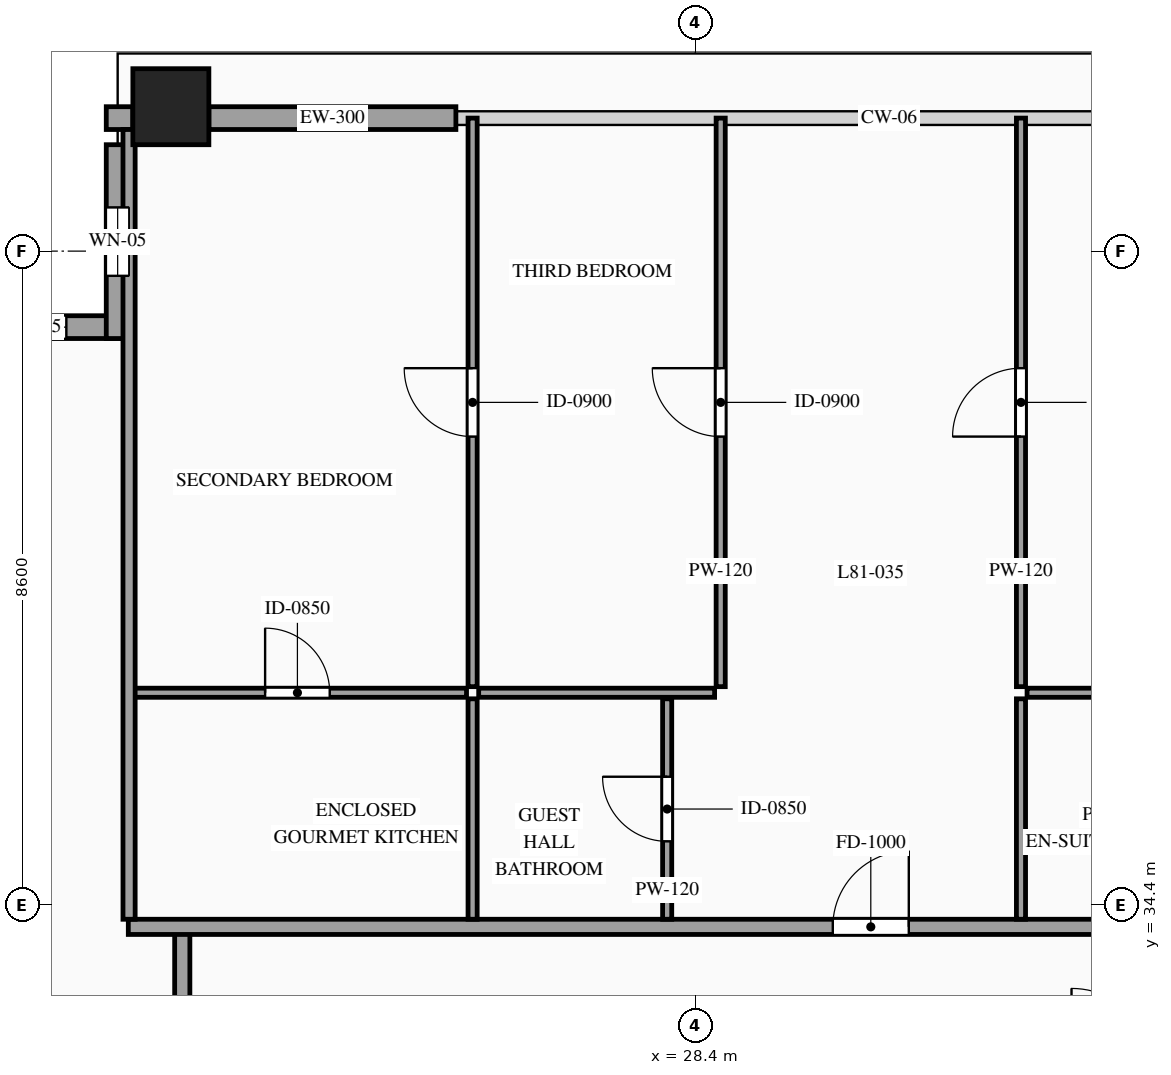
"""IFC4 building model, lengths in metres.
Left out: names, types, materials, properties, quantities, classifications, styles, units other than length and angle.
Written with IfcOpenShell. Run it as: python <this file> out.ifc"""

import sys

from ifc_helpers import new_model, si_unit, direction, frame, frame_2d, origin, origin_2d, place, context, subcontext, project, spatial, rectangle, hollow_rectangle, extrude, source, transform, mapped, element, fill, save


model = new_model("IFC4")
c1 = context("Model", 3, precision=1e-05, world=origin(), true_north=direction((0.0, 1.0)))
c2 = subcontext(c1, "Body", "Model", "MODEL_VIEW")
j1 = project(units=[si_unit("LENGTHUNIT", "METRE"), si_unit("PLANEANGLEUNIT", "RADIAN")], contexts=[c1])
p1 = place(None, origin())
s1 = spatial("IfcSite", under=j1, at=p1, CompositionType="ELEMENT")
p2 = place(p1, origin())
s2 = spatial("IfcBuilding", under=s1, at=p2, CompositionType="ELEMENT")
p3 = place(p2, frame((0.0, 0.0, 303.1)))
s3 = spatial("IfcBuildingStorey", under=s2, at=p3, CompositionType="ELEMENT", Elevation=303.1)
m1 = source(origin(), c2, "Body", "SweptSolid", [
    extrude(hollow_rectangle(XDim=1.0, YDim=1.0, WallThickness=0.048, at=origin_2d()), origin(), (0.0, 0.0, 1.0), 3.5),
])
p4 = place(p3, frame((21.5, 44.9, 0.0), z_axis=(0.0, 0.0, 1.0), x_axis=(1.0, 0.0, 0.0)))
e1 = element("IfcColumn", 1, at=p4, inside=s3, PredefinedType="COLUMN", context=c2, shape_type="MappedRepresentation", body=[
    mapped(m1, transform((0.0, 0.0, 0.0), scale=1.0)),
])
p5 = place(p3, frame((20.95, 42.0, 0.0), z_axis=(0.0, 0.0, 1.0), x_axis=(-1.0, 0.0, 0.0)))
e2 = element("IfcWall", 2, at=p5, inside=s3, PredefinedType="SOLIDWALL", context=c2, shape_type="SweptSolid", body=[
    extrude(rectangle(XDim=2.55, YDim=0.3, at=frame_2d((1.275, 0.0))), origin(), (0.0, 0.0, 1.0), 3.22),
])
p6 = place(p5, frame((0.825, 0.0, 0.75)))
e3 = element("IfcOpeningElement", 3, at=p6, cuts=e2, PredefinedType="OPENING", context=c2, shape_type="SweptSolid", body=[
    extrude(rectangle(XDim=0.9, YDim=1.5, at=frame_2d((0.45, 0.75))), frame((0.0, 0.165, 0.0), z_axis=(0.0, -1.0, 0.0), x_axis=(1.0, 0.0, 0.0)), (0.0, 0.0, 1.0), 0.33),
])
p7 = place(p3, frame((20.8, 44.4, 0.0), z_axis=(0.0, 0.0, 1.0), x_axis=(0.0, -1.0, 0.0)))
e4 = element("IfcWall", 4, at=p7, inside=s3, PredefinedType="SOLIDWALL", context=c2, shape_type="SweptSolid", body=[
    extrude(rectangle(XDim=2.55, YDim=0.3, at=frame_2d((1.275, 0.0))), origin(), (0.0, 0.0, 1.0), 3.22),
])
p8 = place(p7, frame((0.825, 0.0, 0.75)))
e5 = element("IfcOpeningElement", 5, at=p8, cuts=e4, PredefinedType="OPENING", context=c2, shape_type="SweptSolid", body=[
    extrude(rectangle(XDim=0.9, YDim=1.5, at=frame_2d((0.45, 0.75))), frame((0.0, 0.165, 0.0), z_axis=(0.0, -1.0, 0.0), x_axis=(1.0, 0.0, 0.0)), (0.0, 0.0, 1.0), 0.33),
])
m2 = source(origin(), c2, "Body", "SweptSolid", [
    extrude(rectangle(XDim=0.35, YDim=0.3, at=frame_2d((0.175, 0.0))), origin(), (0.0, 0.0, 1.0), 3.22),
])
p9 = place(p3, frame((20.65, 44.75, 0.0), z_axis=(0.0, 0.0, 1.0), x_axis=(1.0, 0.0, 0.0)))
e6 = element("IfcWall", 6, at=p9, inside=s3, PredefinedType="SOLIDWALL", context=c2, shape_type="MappedRepresentation", body=[
    mapped(m2, transform((0.0, 0.0, 0.0), scale=1.0)),
])
m3 = source(origin(), c2, "Body", "SweptSolid", [
    extrude(rectangle(XDim=3.25, YDim=0.3, at=frame_2d((1.625, 0.0))), origin(), (0.0, 0.0, 1.0), 2.825),
])
p10 = place(p3, frame((22.0, 44.75, 0.0), z_axis=(0.0, 0.0, 1.0), x_axis=(1.0, 0.0, 0.0)))
e7 = element("IfcWall", 7, at=p10, inside=s3, PredefinedType="SOLIDWALL", context=c2, shape_type="MappedRepresentation", body=[
    mapped(m3, transform((0.0, 0.0, 0.0), scale=1.0)),
])
m4 = source(origin(), c2, "Body", "SweptSolid", [
    extrude(rectangle(XDim=1.7, YDim=0.2, at=frame_2d((0.85, 0.0))), origin(), (0.0, 0.0, 1.0), 3.22),
])
p11 = place(p3, frame((21.65, 32.35, 0.0), z_axis=(0.0, 0.0, 1.0), x_axis=(0.0, 1.0, 0.0)))
e8 = element("IfcWall", 8, at=p11, inside=s3, PredefinedType="PARTITIONING", context=c2, shape_type="MappedRepresentation", body=[
    mapped(m4, transform((0.0, 0.0, 0.0), scale=1.0)),
])
p12 = place(p3, frame((20.94, 34.11, 0.0), z_axis=(0.0, 0.0, 1.0), x_axis=(1.0, 0.0, 0.0)))
e9 = element("IfcWall", 9, at=p12, inside=s3, PredefinedType="PARTITIONING", context=c2, shape_type="SweptSolid", body=[
    extrude(rectangle(XDim=15.98, YDim=0.2, at=frame_2d((7.99, 0.0))), origin(), (0.0, 0.0, 1.0), 3.22),
])
p13 = place(p12, frame((9.269, 0.0, 0.0)))
e10 = element("IfcOpeningElement", 10, at=p13, cuts=e9, PredefinedType="OPENING", context=c2, shape_type="SweptSolid", body=[
    extrude(rectangle(XDim=1.0, YDim=2.2, at=frame_2d((0.5, 1.1))), frame((0.0, 0.115, 0.0), z_axis=(0.0, -1.0, 0.0), x_axis=(1.0, 0.0, 0.0)), (0.0, 0.0, 1.0), 0.23),
])
p14 = place(p3, frame((20.94, 37.19, 0.0), z_axis=(0.0, 0.0, 1.0), x_axis=(1.0, 0.0, 0.0)))
e11 = element("IfcWall", 11, at=p14, inside=s3, PredefinedType="PARTITIONING", context=c2, shape_type="SweptSolid", body=[
    extrude(rectangle(XDim=4.45, YDim=0.12, at=frame_2d((2.225, 0.0))), origin(), (0.0, 0.0, 1.0), 3.22),
])
p15 = place(p14, frame((1.8, 0.0, 0.0)))
e12 = element("IfcOpeningElement", 12, at=p15, cuts=e11, PredefinedType="OPENING", context=c2, shape_type="SweptSolid", body=[
    extrude(rectangle(XDim=0.85, YDim=2.1, at=frame_2d((0.425, 1.05))), frame((0.0, 0.075, 0.0), z_axis=(0.0, -1.0, 0.0), x_axis=(1.0, 0.0, 0.0)), (0.0, 0.0, 1.0), 0.15),
])
m5 = source(origin(), c2, "Body", "SweptSolid", [
    extrude(rectangle(XDim=2.9, YDim=0.12, at=frame_2d((1.45, 0.0))), origin(), (0.0, 0.0, 1.0), 3.22),
])
p16 = place(p3, frame((25.47, 34.21, 0.0), z_axis=(0.0, 0.0, 1.0), x_axis=(0.0, 1.0, 0.0)))
e13 = element("IfcWall", 13, at=p16, inside=s3, PredefinedType="PARTITIONING", context=c2, shape_type="MappedRepresentation", body=[
    mapped(m5, transform((0.0, 0.0, 0.0), scale=1.0)),
])
p17 = place(p3, frame((28.03, 34.21, 0.0), z_axis=(0.0, 0.0, 1.0), x_axis=(0.0, 1.0, 0.0)))
e14 = element("IfcWall", 14, at=p17, inside=s3, PredefinedType="PARTITIONING", context=c2, shape_type="SweptSolid", body=[
    extrude(rectangle(XDim=2.9, YDim=0.12, at=frame_2d((1.45, 0.0))), origin(), (0.0, 0.0, 1.0), 3.22),
])
p18 = place(p17, frame((1.025, 0.0, 0.0)))
e15 = element("IfcOpeningElement", 15, at=p18, cuts=e14, PredefinedType="OPENING", context=c2, shape_type="SweptSolid", body=[
    extrude(rectangle(XDim=0.85, YDim=2.1, at=frame_2d((0.425, 1.05))), frame((0.0, 0.075, 0.0), z_axis=(0.0, -1.0, 0.0), x_axis=(1.0, 0.0, 0.0)), (0.0, 0.0, 1.0), 0.15),
])
p19 = place(p3, frame((32.765, 37.19, 0.0), z_axis=(0.0, 0.0, 1.0), x_axis=(1.0, 0.0, 0.0)))
e16 = element("IfcWall", 16, at=p19, inside=s3, PredefinedType="PARTITIONING", context=c2, shape_type="SweptSolid", body=[
    extrude(rectangle(XDim=4.155, YDim=0.12, at=frame_2d((2.078, 0.0))), origin(), (0.0, 0.0, 1.0), 3.22),
])
p20 = place(p19, frame((1.653, 0.0, 0.0)))
e17 = element("IfcOpeningElement", 17, at=p20, cuts=e16, PredefinedType="OPENING", context=c2, shape_type="SweptSolid", body=[
    extrude(rectangle(XDim=0.85, YDim=2.1, at=frame_2d((0.425, 1.05))), frame((0.0, 0.075, 0.0), z_axis=(0.0, -1.0, 0.0), x_axis=(1.0, 0.0, 0.0)), (0.0, 0.0, 1.0), 0.15),
])
p21 = place(p3, frame((32.685, 34.21, 0.0), z_axis=(0.0, 0.0, 1.0), x_axis=(0.0, 1.0, 0.0)))
e18 = element("IfcWall", 18, at=p21, inside=s3, PredefinedType="PARTITIONING", context=c2, shape_type="MappedRepresentation", body=[
    mapped(m5, transform((0.0, 0.0, 0.0), scale=1.0)),
])
p22 = place(p3, frame((25.47, 37.27, 0.0), z_axis=(0.0, 0.0, 1.0), x_axis=(0.0, 1.0, 0.0)))
e19 = element("IfcWall", 19, at=p22, inside=s3, PredefinedType="PARTITIONING", context=c2, shape_type="SweptSolid", body=[
    extrude(rectangle(XDim=7.48, YDim=0.12, at=frame_2d((3.74, 0.0))), origin(), (0.0, 0.0, 1.0), 3.22),
])
p23 = place(p22, frame((3.29, 0.0, 0.0)))
e20 = element("IfcOpeningElement", 20, at=p23, cuts=e19, PredefinedType="OPENING", context=c2, shape_type="SweptSolid", body=[
    extrude(rectangle(XDim=0.9, YDim=2.15, at=frame_2d((0.45, 1.075))), frame((0.0, 0.075, 0.0), z_axis=(0.0, -1.0, 0.0), x_axis=(1.0, 0.0, 0.0)), (0.0, 0.0, 1.0), 0.15),
])
p24 = place(p3, frame((32.685, 37.27, 0.0), z_axis=(0.0, 0.0, 1.0), x_axis=(0.0, 1.0, 0.0)))
e21 = element("IfcWall", 21, at=p24, inside=s3, PredefinedType="PARTITIONING", context=c2, shape_type="SweptSolid", body=[
    extrude(rectangle(XDim=7.48, YDim=0.12, at=frame_2d((3.74, 0.0))), origin(), (0.0, 0.0, 1.0), 3.22),
])
p25 = place(p24, frame((3.29, 0.0, 0.0)))
e22 = element("IfcOpeningElement", 22, at=p25, cuts=e21, PredefinedType="OPENING", context=c2, shape_type="SweptSolid", body=[
    extrude(rectangle(XDim=0.9, YDim=2.15, at=frame_2d((0.45, 1.075))), frame((0.0, 0.075, 0.0), z_axis=(0.0, -1.0, 0.0), x_axis=(1.0, 0.0, 0.0)), (0.0, 0.0, 1.0), 0.15),
])
m6 = source(origin(), c2, "Body", "SweptSolid", [
    extrude(rectangle(XDim=3.104, YDim=0.12, at=frame_2d((1.552, 0.0))), origin(), (0.0, 0.0, 1.0), 3.22),
])
p26 = place(p3, frame((25.55, 37.19, 0.0), z_axis=(0.0, 0.0, 1.0), x_axis=(1.0, 0.0, 0.0)))
e23 = element("IfcWall", 23, at=p26, inside=s3, PredefinedType="PARTITIONING", context=c2, shape_type="MappedRepresentation", body=[
    mapped(m6, transform((0.0, 0.0, 0.0), scale=1.0)),
])
p27 = place(p3, frame((28.734, 37.27, 0.0), z_axis=(0.0, 0.0, 1.0), x_axis=(0.0, 1.0, 0.0)))
e24 = element("IfcWall", 24, at=p27, inside=s3, PredefinedType="PARTITIONING", context=c2, shape_type="SweptSolid", body=[
    extrude(rectangle(XDim=7.48, YDim=0.12, at=frame_2d((3.74, 0.0))), origin(), (0.0, 0.0, 1.0), 3.22),
])
p28 = place(p27, frame((3.29, 0.0, 0.0)))
e25 = element("IfcOpeningElement", 25, at=p28, cuts=e24, PredefinedType="OPENING", context=c2, shape_type="SweptSolid", body=[
    extrude(rectangle(XDim=0.9, YDim=2.15, at=frame_2d((0.45, 1.075))), frame((0.0, 0.075, 0.0), z_axis=(0.0, -1.0, 0.0), x_axis=(1.0, 0.0, 0.0)), (0.0, 0.0, 1.0), 0.15),
])
m7 = source(origin(), c2, "Body", "SweptSolid", [
    extrude(rectangle(XDim=10.39, YDim=0.16, at=frame_2d((5.195, 0.0))), origin(), (0.0, 0.0, 1.0), 3.22),
])
p29 = place(p3, frame((20.95, 34.21, 0.0), z_axis=(0.0, 0.0, 1.0), x_axis=(0.0, 1.0, 0.0)))
e26 = element("IfcWall", 26, at=p29, inside=s3, PredefinedType="PARTITIONING", context=c2, shape_type="MappedRepresentation", body=[
    mapped(m7, transform((0.0, 0.0, 0.0), scale=1.0)),
])
m8 = source(origin(), c2, "Body", "SweptSolid", [
    extrude(rectangle(XDim=0.9, YDim=1.5, at=frame_2d((0.45, 0.75))), frame((0.0, 0.03, 0.0), z_axis=(0.0, -1.0, 0.0), x_axis=(1.0, 0.0, 0.0)), (0.0, 0.0, 1.0), 0.06),
])
p30 = place(p6, origin())
e27 = element("IfcWindow", 27, at=p30, inside=s3, PartitioningType="SINGLE_PANEL", PredefinedType="WINDOW", context=c2, shape_type="MappedRepresentation", body=[
    mapped(m8, transform((0.0, 0.0, 0.0), scale=1.0)),
])
fill(e3, e27)
p31 = place(p8, origin())
e28 = element("IfcWindow", 28, at=p31, inside=s3, PartitioningType="SINGLE_PANEL", PredefinedType="WINDOW", context=c2, shape_type="MappedRepresentation", body=[
    mapped(m8, transform((0.0, 0.0, 0.0), scale=1.0)),
])
fill(e5, e28)
m9 = source(origin(), c2, "Body", "SweptSolid", [
    extrude(rectangle(XDim=1.0, YDim=2.2, at=frame_2d((0.5, 1.1))), frame((0.0, 0.025, 0.0), z_axis=(0.0, -1.0, 0.0), x_axis=(1.0, 0.0, 0.0)), (0.0, 0.0, 1.0), 0.05),
])
p32 = place(p13, origin())
e29 = element("IfcDoor", 29, at=p32, inside=s3, OperationType="SINGLE_SWING_RIGHT", PredefinedType="DOOR", context=c2, shape_type="MappedRepresentation", body=[
    mapped(m9, transform((0.0, 0.0, 0.0), scale=1.0)),
])
fill(e10, e29)
m10 = source(origin(), c2, "Body", "SweptSolid", [
    extrude(rectangle(XDim=0.85, YDim=2.1, at=frame_2d((0.425, 1.05))), frame((0.0, 0.025, 0.0), z_axis=(0.0, -1.0, 0.0), x_axis=(1.0, 0.0, 0.0)), (0.0, 0.0, 1.0), 0.05),
])
p33 = place(p15, origin())
e30 = element("IfcDoor", 30, at=p33, inside=s3, OperationType="SINGLE_SWING_LEFT", PredefinedType="DOOR", context=c2, shape_type="MappedRepresentation", body=[
    mapped(m10, transform((0.0, 0.0, 0.0), scale=1.0)),
])
fill(e12, e30)
p34 = place(p18, origin())
e31 = element("IfcDoor", 31, at=p34, inside=s3, OperationType="SINGLE_SWING_RIGHT", PredefinedType="DOOR", context=c2, shape_type="MappedRepresentation", body=[
    mapped(m10, transform((0.0, 0.0, 0.0), scale=1.0)),
])
fill(e15, e31)
m11 = source(origin(), c2, "Body", "SweptSolid", [
    extrude(rectangle(XDim=0.9, YDim=2.15, at=frame_2d((0.45, 1.075))), frame((0.0, 0.025, 0.0), z_axis=(0.0, -1.0, 0.0), x_axis=(1.0, 0.0, 0.0)), (0.0, 0.0, 1.0), 0.05),
])
p35 = place(p23, origin())
e32 = element("IfcDoor", 32, at=p35, inside=s3, OperationType="SINGLE_SWING_RIGHT", PredefinedType="DOOR", context=c2, shape_type="MappedRepresentation", body=[
    mapped(m11, transform((0.0, 0.0, 0.0), scale=1.0)),
])
fill(e20, e32)
p36 = place(p25, origin())
e33 = element("IfcDoor", 33, at=p36, inside=s3, OperationType="SINGLE_SWING_LEFT", PredefinedType="DOOR", context=c2, shape_type="MappedRepresentation", body=[
    mapped(m11, transform((0.0, 0.0, 0.0), scale=1.0)),
])
fill(e22, e33)
p37 = place(p28, origin())
e34 = element("IfcDoor", 34, at=p37, inside=s3, OperationType="SINGLE_SWING_RIGHT", PredefinedType="DOOR", context=c2, shape_type="MappedRepresentation", body=[
    mapped(m11, transform((0.0, 0.0, 0.0), scale=1.0)),
])
fill(e25, e34)
save(model, sys.argv[1])
